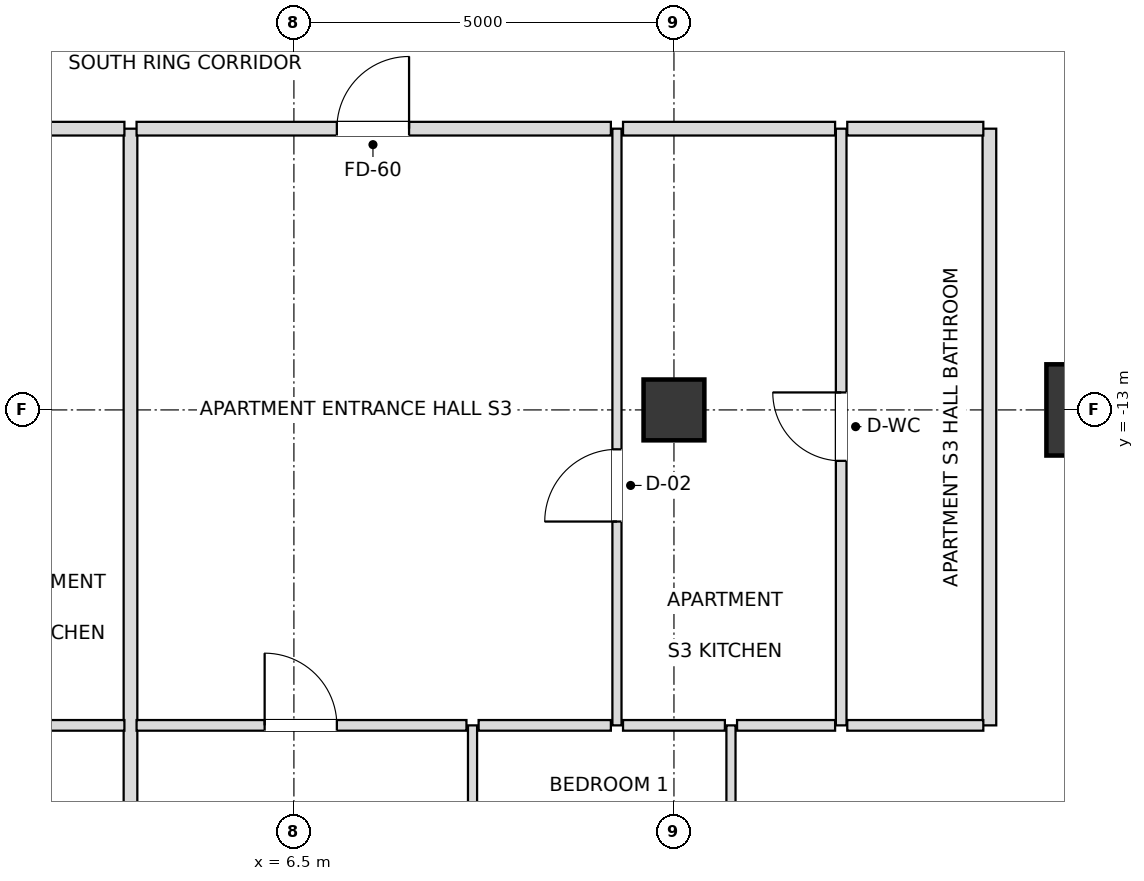
"""IFC4 building model, lengths in metres.
Left out: names, types, materials, properties, quantities, classifications, styles, units other than length and angle.
Written with IfcOpenShell. Run it as: python <this file> out.ifc"""

import sys

from ifc_helpers import new_model, si_unit, direction, frame, frame_2d, origin, origin_2d, place, context, subcontext, project, spatial, rectangle, extrude, element, fill, save


model = new_model("IFC4")
c1 = context("Model", 3, precision=1e-05, world=origin(), true_north=direction((0.0, 1.0)))
c2 = subcontext(c1, "Body", "Model", "MODEL_VIEW")
j1 = project(units=[si_unit("LENGTHUNIT", "METRE"), si_unit("PLANEANGLEUNIT", "RADIAN")], contexts=[c1])
p1 = place(None, origin())
s1 = spatial("IfcSite", under=j1, at=p1, CompositionType="ELEMENT")
p2 = place(p1, origin())
s2 = spatial("IfcBuilding", under=s1, at=p2, CompositionType="ELEMENT")
p3 = place(p2, frame((0.0, 0.0, 102.6)))
s3 = spatial("IfcBuildingStorey", under=s2, at=p3, CompositionType="ELEMENT", Elevation=102.6)
p4 = place(p3, frame((17.0, -13.0, 0.0), z_axis=(0.0, 0.0, 1.0), x_axis=(1.0, 0.0, 0.0)))
e1 = element("IfcColumn", 1, at=p4, inside=s3, PredefinedType="USERDEFINED", context=c2, shape_type="SweptSolid", body=[
    extrude(rectangle(XDim=1.2, YDim=1.2, at=origin_2d()), origin(), (0.0, 0.0, 1.0), 3.6),
])
p5 = place(p3, frame((11.5, -13.0, 0.0), z_axis=(0.0, 0.0, 1.0), x_axis=(1.0, 0.0, 0.0)))
e2 = element("IfcColumn", 2, at=p5, inside=s3, PredefinedType="COLUMN", context=c2, shape_type="SweptSolid", body=[
    extrude(rectangle(XDim=0.8, YDim=0.8, at=origin_2d()), origin(), (0.0, 0.0, 1.0), 3.6),
])
p6 = place(p3, frame((4.35, -23.15, 0.0), z_axis=(0.0, 0.0, 1.0), x_axis=(0.0, 1.0, 0.0)))
e3 = element("IfcWall", 3, at=p6, inside=s3, PredefinedType="PARTITIONING", context=c2, shape_type="SweptSolid", body=[
    extrude(rectangle(XDim=13.85, YDim=0.18, at=frame_2d((6.925, 0.0))), origin(), (0.0, 0.0, 1.0), 2.816),
])
p7 = place(p3, frame((8.85, -23.15, 0.0), z_axis=(0.0, 0.0, 1.0), x_axis=(0.0, 1.0, 0.0)))
e4 = element("IfcWall", 4, at=p7, inside=s3, PredefinedType="PARTITIONING", context=c2, shape_type="SweptSolid", body=[
    extrude(rectangle(XDim=6.0, YDim=0.12, at=frame_2d((3.0, 0.0))), origin(), (0.0, 0.0, 1.0), 2.816),
])
p8 = place(p7, frame((2.55, 0.0, 0.0)))
e5 = element("IfcOpeningElement", 5, at=p8, cuts=e4, PredefinedType="OPENING", context=c2, shape_type="SweptSolid", body=[
    extrude(rectangle(XDim=0.9, YDim=2.1, at=frame_2d((0.45, 1.05))), frame((0.0, 0.07, 0.0), z_axis=(0.0, -1.0, 0.0), x_axis=(1.0, 0.0, 0.0)), (0.0, 0.0, 1.0), 0.14),
])
p9 = place(p3, frame((10.75, -17.15, 0.0), z_axis=(0.0, 0.0, 1.0), x_axis=(0.0, 1.0, 0.0)))
e6 = element("IfcWall", 6, at=p9, inside=s3, PredefinedType="PARTITIONING", context=c2, shape_type="SweptSolid", body=[
    extrude(rectangle(XDim=7.85, YDim=0.12, at=frame_2d((3.925, 0.0))), origin(), (0.0, 0.0, 1.0), 2.816),
])
p10 = place(p9, frame((2.681, 0.0, 0.0)))
e7 = element("IfcOpeningElement", 7, at=p10, cuts=e6, PredefinedType="OPENING", context=c2, shape_type="SweptSolid", body=[
    extrude(rectangle(XDim=0.95, YDim=2.1, at=frame_2d((0.475, 1.05))), frame((0.0, 0.07, 0.0), z_axis=(0.0, -1.0, 0.0), x_axis=(1.0, 0.0, 0.0)), (0.0, 0.0, 1.0), 0.14),
])
p11 = place(p3, frame((12.25, -23.15, 0.0), z_axis=(0.0, 0.0, 1.0), x_axis=(0.0, 1.0, 0.0)))
e8 = element("IfcWall", 8, at=p11, inside=s3, PredefinedType="PARTITIONING", context=c2, shape_type="SweptSolid", body=[
    extrude(rectangle(XDim=6.0, YDim=0.12, at=frame_2d((3.0, 0.0))), origin(), (0.0, 0.0, 1.0), 2.736),
])
p12 = place(p11, frame((1.399, 0.0, 0.0)))
e9 = element("IfcOpeningElement", 9, at=p12, cuts=e8, PredefinedType="OPENING", context=c2, shape_type="SweptSolid", body=[
    extrude(rectangle(XDim=0.9, YDim=2.1, at=frame_2d((0.45, 1.05))), frame((0.0, 0.07, 0.0), z_axis=(0.0, -1.0, 0.0), x_axis=(1.0, 0.0, 0.0)), (0.0, 0.0, 1.0), 0.14),
])
p13 = place(p3, frame((13.7, -17.15, 0.0), z_axis=(0.0, 0.0, 1.0), x_axis=(0.0, 1.0, 0.0)))
e10 = element("IfcWall", 10, at=p13, inside=s3, PredefinedType="PARTITIONING", context=c2, shape_type="SweptSolid", body=[
    extrude(rectangle(XDim=7.85, YDim=0.14, at=frame_2d((3.925, 0.0))), origin(), (0.0, 0.0, 1.0), 2.736),
])
p14 = place(p13, frame((3.48, 0.0, 0.0)))
e11 = element("IfcOpeningElement", 11, at=p14, cuts=e10, PredefinedType="OPENING", context=c2, shape_type="SweptSolid", body=[
    extrude(rectangle(XDim=0.9, YDim=2.1, at=frame_2d((0.45, 1.05))), frame((0.0, 0.08, 0.0), z_axis=(0.0, -1.0, 0.0), x_axis=(1.0, 0.0, 0.0)), (0.0, 0.0, 1.0), 0.16),
])
p15 = place(p3, frame((15.65, -17.15, 0.0), z_axis=(0.0, 0.0, 1.0), x_axis=(0.0, 1.0, 0.0)))
e12 = element("IfcWall", 12, at=p15, inside=s3, PredefinedType="PARTITIONING", context=c2, shape_type="SweptSolid", body=[
    extrude(rectangle(XDim=7.85, YDim=0.18, at=frame_2d((3.925, 0.0))), origin(), (0.0, 0.0, 1.0), 2.736),
])
p16 = place(p3, frame((2.18, -17.15, 0.0), z_axis=(0.0, 0.0, 1.0), x_axis=(1.0, 0.0, 0.0)))
e13 = element("IfcWall", 13, at=p16, inside=s3, PredefinedType="PARTITIONING", context=c2, shape_type="SweptSolid", body=[
    extrude(rectangle(XDim=2.09, YDim=0.14, at=frame_2d((1.045, 0.0))), origin(), (0.0, 0.0, 1.0), 3.38),
])
p17 = place(p3, frame((4.43, -17.15, 0.0), z_axis=(0.0, 0.0, 1.0), x_axis=(1.0, 0.0, 0.0)))
e14 = element("IfcWall", 14, at=p17, inside=s3, PredefinedType="PARTITIONING", context=c2, shape_type="SweptSolid", body=[
    extrude(rectangle(XDim=4.34, YDim=0.14, at=frame_2d((2.17, 0.0))), origin(), (0.0, 0.0, 1.0), 2.816),
])
p18 = place(p17, frame((1.685, 0.0, 0.0)))
e15 = element("IfcOpeningElement", 15, at=p18, cuts=e14, PredefinedType="OPENING", context=c2, shape_type="SweptSolid", body=[
    extrude(rectangle(XDim=0.95, YDim=2.1, at=frame_2d((0.475, 1.05))), frame((0.0, 0.08, 0.0), z_axis=(0.0, -1.0, 0.0), x_axis=(1.0, 0.0, 0.0)), (0.0, 0.0, 1.0), 0.16),
])
p19 = place(p3, frame((8.93, -17.15, 0.0), z_axis=(0.0, 0.0, 1.0), x_axis=(1.0, 0.0, 0.0)))
e16 = element("IfcWall", 16, at=p19, inside=s3, PredefinedType="PARTITIONING", context=c2, shape_type="SweptSolid", body=[
    extrude(rectangle(XDim=1.74, YDim=0.14, at=frame_2d((0.87, 0.0))), origin(), (0.0, 0.0, 1.0), 3.38),
])
p20 = place(p3, frame((10.83, -17.15, 0.0), z_axis=(0.0, 0.0, 1.0), x_axis=(1.0, 0.0, 0.0)))
e17 = element("IfcWall", 17, at=p20, inside=s3, PredefinedType="PARTITIONING", context=c2, shape_type="SweptSolid", body=[
    extrude(rectangle(XDim=1.34, YDim=0.14, at=frame_2d((0.67, 0.0))), origin(), (0.0, 0.0, 1.0), 2.736),
])
p21 = place(p3, frame((12.33, -17.15, 0.0), z_axis=(0.0, 0.0, 1.0), x_axis=(1.0, 0.0, 0.0)))
e18 = element("IfcWall", 18, at=p21, inside=s3, PredefinedType="PARTITIONING", context=c2, shape_type="SweptSolid", body=[
    extrude(rectangle(XDim=1.29, YDim=0.14, at=frame_2d((0.645, 0.0))), origin(), (0.0, 0.0, 1.0), 2.736),
])
p22 = place(p3, frame((13.78, -17.15, 0.0), z_axis=(0.0, 0.0, 1.0), x_axis=(1.0, 0.0, 0.0)))
e19 = element("IfcWall", 19, at=p22, inside=s3, PredefinedType="PARTITIONING", context=c2, shape_type="SweptSolid", body=[
    extrude(rectangle(XDim=1.79, YDim=0.14, at=frame_2d((0.895, 0.0))), origin(), (0.0, 0.0, 1.0), 2.736),
])
p23 = place(p3, frame((2.18, -9.3, 0.0), z_axis=(0.0, 0.0, 1.0), x_axis=(1.0, 0.0, 0.0)))
e20 = element("IfcWall", 20, at=p23, inside=s3, PredefinedType="PARTITIONING", context=c2, shape_type="SweptSolid", body=[
    extrude(rectangle(XDim=2.09, YDim=0.18, at=frame_2d((1.045, 0.0))), origin(), (0.0, 0.0, 1.0), 3.38),
])
p24 = place(p3, frame((4.43, -9.3, 0.0), z_axis=(0.0, 0.0, 1.0), x_axis=(1.0, 0.0, 0.0)))
e21 = element("IfcWall", 21, at=p24, inside=s3, PredefinedType="PARTITIONING", context=c2, shape_type="SweptSolid", body=[
    extrude(rectangle(XDim=6.24, YDim=0.18, at=frame_2d((3.12, 0.0))), origin(), (0.0, 0.0, 1.0), 2.816),
])
p25 = place(p24, frame((2.635, 0.0, 0.0)))
e22 = element("IfcOpeningElement", 22, at=p25, cuts=e21, PredefinedType="OPENING", context=c2, shape_type="SweptSolid", body=[
    extrude(rectangle(XDim=0.95, YDim=2.15, at=frame_2d((0.475, 1.075))), frame((0.0, 0.1, 0.0), z_axis=(0.0, -1.0, 0.0), x_axis=(1.0, 0.0, 0.0)), (0.0, 0.0, 1.0), 0.2),
])
p26 = place(p3, frame((10.83, -9.3, 0.0), z_axis=(0.0, 0.0, 1.0), x_axis=(1.0, 0.0, 0.0)))
e23 = element("IfcWall", 23, at=p26, inside=s3, PredefinedType="PARTITIONING", context=c2, shape_type="SweptSolid", body=[
    extrude(rectangle(XDim=2.79, YDim=0.18, at=frame_2d((1.395, 0.0))), origin(), (0.0, 0.0, 1.0), 3.38),
])
p27 = place(p3, frame((13.78, -9.3, 0.0), z_axis=(0.0, 0.0, 1.0), x_axis=(1.0, 0.0, 0.0)))
e24 = element("IfcWall", 24, at=p27, inside=s3, PredefinedType="PARTITIONING", context=c2, shape_type="SweptSolid", body=[
    extrude(rectangle(XDim=1.79, YDim=0.18, at=frame_2d((0.895, 0.0))), origin(), (0.0, 0.0, 1.0), 3.38),
])
p28 = place(p25, origin())
e25 = element("IfcDoor", 25, at=p28, inside=s3, OperationType="SINGLE_SWING_RIGHT", PredefinedType="DOOR", context=c2, shape_type="SweptSolid", body=[
    extrude(rectangle(XDim=0.95, YDim=2.15, at=frame_2d((0.475, 1.075))), frame((0.0, 0.025, 0.0), z_axis=(0.0, -1.0, 0.0), x_axis=(1.0, 0.0, 0.0)), (0.0, 0.0, 1.0), 0.05),
])
fill(e22, e25)
p29 = place(p10, origin())
e26 = element("IfcDoor", 26, at=p29, inside=s3, OperationType="SINGLE_SWING_LEFT", PredefinedType="DOOR", context=c2, shape_type="SweptSolid", body=[
    extrude(rectangle(XDim=0.95, YDim=2.1, at=frame_2d((0.475, 1.05))), frame((0.0, 0.025, 0.0), z_axis=(0.0, -1.0, 0.0), x_axis=(1.0, 0.0, 0.0)), (0.0, 0.0, 1.0), 0.05),
])
fill(e7, e26)
p30 = place(p14, origin())
e27 = element("IfcDoor", 27, at=p30, inside=s3, OperationType="SINGLE_SWING_RIGHT", PredefinedType="DOOR", context=c2, shape_type="SweptSolid", body=[
    extrude(rectangle(XDim=0.9, YDim=2.1, at=frame_2d((0.45, 1.05))), frame((0.0, 0.025, 0.0), z_axis=(0.0, -1.0, 0.0), x_axis=(1.0, 0.0, 0.0)), (0.0, 0.0, 1.0), 0.05),
])
fill(e11, e27)
p31 = place(p18, origin())
e28 = element("IfcDoor", 28, at=p31, inside=s3, OperationType="SINGLE_SWING_LEFT", PredefinedType="DOOR", context=c2, shape_type="SweptSolid", body=[
    extrude(rectangle(XDim=0.95, YDim=2.1, at=frame_2d((0.475, 1.05))), frame((0.0, 0.025, 0.0), z_axis=(0.0, -1.0, 0.0), x_axis=(1.0, 0.0, 0.0)), (0.0, 0.0, 1.0), 0.05),
])
fill(e15, e28)
save(model, sys.argv[1])
